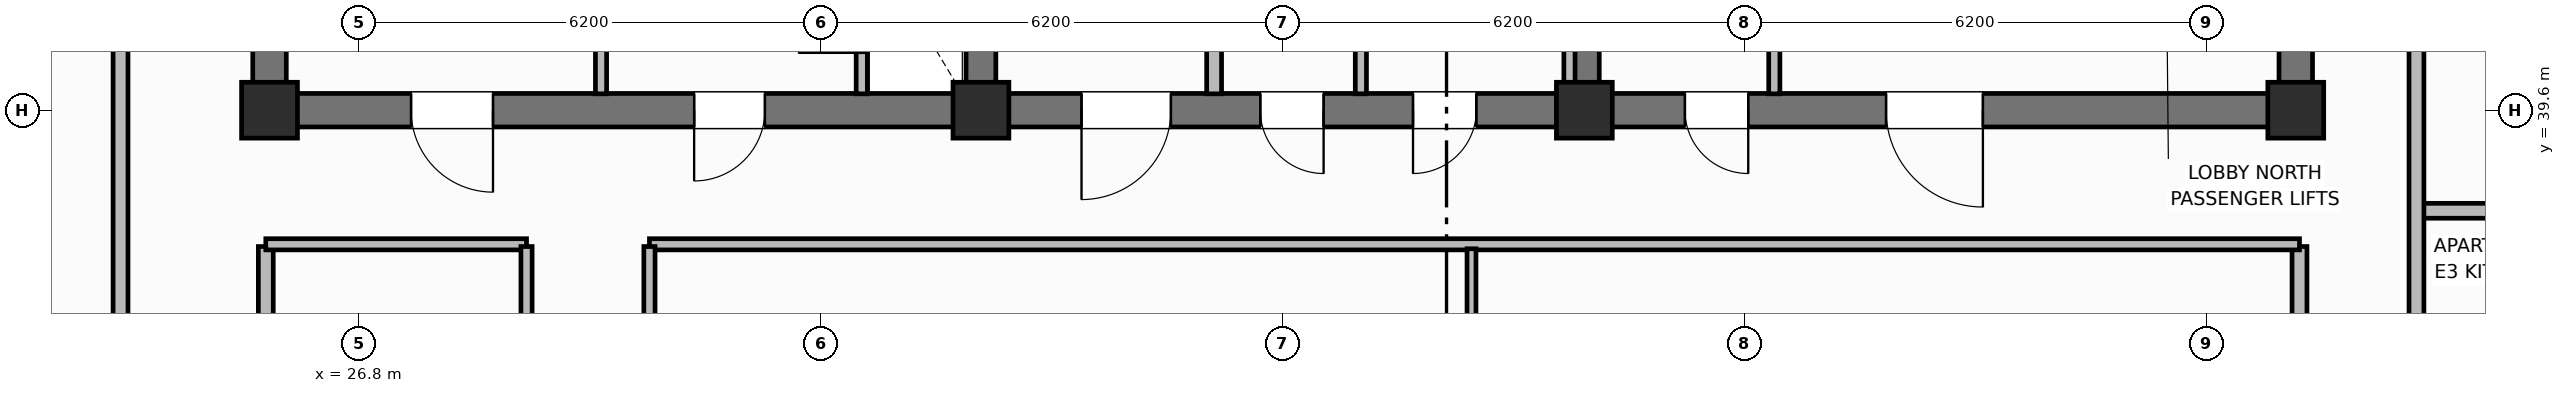
"""IFC4 building model, lengths in metres.
Left out: names, types, materials, properties, quantities, classifications, styles, units other than length and angle.
Written with IfcOpenShell. Run it as: python <this file> out.ifc"""

import sys

from ifc_helpers import new_model, si_unit, direction, frame, frame_2d, origin, origin_2d, place, context, subcontext, project, spatial, rectangle, extrude, element, fill, save


model = new_model("IFC4")
c1 = context("Model", 3, precision=1e-05, world=origin(), true_north=direction((0.0, 1.0)))
c2 = subcontext(c1, "Body", "Model", "MODEL_VIEW")
j1 = project(units=[si_unit("LENGTHUNIT", "METRE"), si_unit("PLANEANGLEUNIT", "RADIAN")], contexts=[c1])
p1 = place(None, origin())
s1 = spatial("IfcSite", under=j1, at=p1, CompositionType="ELEMENT")
p2 = place(p1, origin())
s2 = spatial("IfcBuilding", under=s1, at=p2, CompositionType="ELEMENT")
p3 = place(p2, frame((0.0, 0.0, 278.7)))
s3 = spatial("IfcBuildingStorey", under=s2, at=p3, CompositionType="ELEMENT", Elevation=278.7)
for number, where, z_axis, x_axis in (
    (1, (25.6, 39.825, 0.0), (0.0, 0.0, 1.0), (0.0, 1.0, 0.0)),
    (2, (52.8, 39.825, 0.0), (0.0, 0.0, 1.0), (0.0, 1.0, 0.0)),
):
    element("IfcWall", number, at=place(p3, frame(where, z_axis=z_axis, x_axis=x_axis)), inside=s3, PredefinedType="SHEAR", context=c2, shape_type="SweptSolid", body=[
        extrude(rectangle(XDim=5.75, YDim=0.45, at=frame_2d((2.875, 0.0))), origin(), (0.0, 0.0, 1.0), 3.7),
    ])
p4 = place(p3, frame((52.8, 39.6, 0.0), z_axis=(0.0, 0.0, 1.0), x_axis=(-1.0, 0.0, 0.0)))
e3 = element("IfcWall", 3, at=p4, inside=s3, PredefinedType="SHEAR", context=c2, shape_type="SweptSolid", body=[
    extrude(rectangle(XDim=27.2, YDim=0.45, at=frame_2d((13.6, 0.0))), origin(), (0.0, 0.0, 1.0), 3.7),
])
p5 = place(p4, frame((24.2, 0.0, 0.0)))
e4 = element("IfcOpeningElement", 4, at=p5, cuts=e3, PredefinedType="OPENING", context=c2, shape_type="SweptSolid", body=[
    extrude(rectangle(XDim=1.1, YDim=2.15, at=frame_2d((0.55, 1.075))), frame((0.0, 0.235, 0.0), z_axis=(0.0, -1.0, 0.0), x_axis=(1.0, 0.0, 0.0)), (0.0, 0.0, 1.0), 0.47),
])
p6 = place(p4, frame((20.55, 0.0, 0.0)))
e5 = element("IfcOpeningElement", 5, at=p6, cuts=e3, PredefinedType="OPENING", context=c2, shape_type="SweptSolid", body=[
    extrude(rectangle(XDim=0.95, YDim=2.1, at=frame_2d((0.475, 1.05))), frame((0.0, 0.235, 0.0), z_axis=(0.0, -1.0, 0.0), x_axis=(1.0, 0.0, 0.0)), (0.0, 0.0, 1.0), 0.47),
])
p7 = place(p4, frame((15.1, 0.0, 0.0)))
e6 = element("IfcOpeningElement", 6, at=p7, cuts=e3, PredefinedType="OPENING", context=c2, shape_type="SweptSolid", body=[
    extrude(rectangle(XDim=1.2, YDim=2.15, at=frame_2d((0.6, 1.075))), frame((0.0, 0.235, 0.0), z_axis=(0.0, -1.0, 0.0), x_axis=(1.0, 0.0, 0.0)), (0.0, 0.0, 1.0), 0.47),
])
p8 = place(p4, frame((13.05, 0.0, 0.0)))
e7 = element("IfcOpeningElement", 7, at=p8, cuts=e3, PredefinedType="OPENING", context=c2, shape_type="SweptSolid", body=[
    extrude(rectangle(XDim=0.85, YDim=2.1, at=frame_2d((0.425, 1.05))), frame((0.0, 0.235, 0.0), z_axis=(0.0, -1.0, 0.0), x_axis=(1.0, 0.0, 0.0)), (0.0, 0.0, 1.0), 0.47),
])
p9 = place(p4, frame((11.0, 0.0, 0.0)))
e8 = element("IfcOpeningElement", 8, at=p9, cuts=e3, PredefinedType="OPENING", context=c2, shape_type="SweptSolid", body=[
    extrude(rectangle(XDim=0.85, YDim=2.1, at=frame_2d((0.425, 1.05))), frame((0.0, 0.235, 0.0), z_axis=(0.0, -1.0, 0.0), x_axis=(1.0, 0.0, 0.0)), (0.0, 0.0, 1.0), 0.47),
])
p10 = place(p4, frame((7.35, 0.0, 0.0)))
e9 = element("IfcOpeningElement", 9, at=p10, cuts=e3, PredefinedType="OPENING", context=c2, shape_type="SweptSolid", body=[
    extrude(rectangle(XDim=0.85, YDim=2.1, at=frame_2d((0.425, 1.05))), frame((0.0, 0.235, 0.0), z_axis=(0.0, -1.0, 0.0), x_axis=(1.0, 0.0, 0.0)), (0.0, 0.0, 1.0), 0.47),
])
p11 = place(p4, frame((4.2, 0.0, 0.0)))
e10 = element("IfcOpeningElement", 10, at=p11, cuts=e3, PredefinedType="OPENING", context=c2, shape_type="SweptSolid", body=[
    extrude(rectangle(XDim=1.3, YDim=2.2, at=frame_2d((0.65, 1.1))), frame((0.0, 0.235, 0.0), z_axis=(0.0, -1.0, 0.0), x_axis=(1.0, 0.0, 0.0)), (0.0, 0.0, 1.0), 0.47),
])
for number, where, z_axis, x_axis in (
    (11, (35.15, 39.825, 0.0), (0.0, 0.0, 1.0), (0.0, 1.0, 0.0)),
    (12, (43.25, 39.825, 0.0), (0.0, 0.0, 1.0), (0.0, 1.0, 0.0)),
):
    element("IfcWall", number, at=place(p3, frame(where, z_axis=z_axis, x_axis=x_axis)), inside=s3, PredefinedType="SHEAR", context=c2, shape_type="SweptSolid", body=[
        extrude(rectangle(XDim=5.75, YDim=0.4, at=frame_2d((2.875, 0.0))), origin(), (0.0, 0.0, 1.0), 3.7),
    ])
for number, where, z_axis, x_axis in (
    (13, (25.6, 39.6, 0.0), (0.0, 0.0, 1.0), (1.0, 0.0, 0.0)),
    (14, (35.15, 39.6, 0.0), (0.0, 0.0, 1.0), (1.0, 0.0, 0.0)),
    (15, (43.25, 39.6, 0.0), (0.0, 0.0, 1.0), (1.0, 0.0, 0.0)),
    (16, (52.8, 39.6, 0.0), (0.0, 0.0, 1.0), (1.0, 0.0, 0.0)),
):
    element("IfcColumn", number, at=place(p3, frame(where, z_axis=z_axis, x_axis=x_axis)), inside=s3, PredefinedType="COLUMN", context=c2, shape_type="SweptSolid", body=[
        extrude(rectangle(XDim=0.75, YDim=0.75, at=origin_2d()), origin(), (0.0, 0.0, 1.0), 3.7),
    ])
p12 = place(p3, frame((33.55, 39.82, 0.0), z_axis=(0.0, 0.0, 1.0), x_axis=(0.0, 1.0, 0.0)))
e17 = element("IfcWall", 17, at=p12, inside=s3, PredefinedType="PARTITIONING", context=c2, shape_type="SweptSolid", body=[
    extrude(rectangle(XDim=2.13, YDim=0.15, at=frame_2d((1.065, 0.0))), origin(), (0.0, 0.0, 1.0), 2.56),
])
p13 = place(p12, frame((0.55, 0.0, 0.0)))
e18 = element("IfcOpeningElement", 18, at=p13, cuts=e17, PredefinedType="OPENING", context=c2, shape_type="SweptSolid", body=[
    extrude(rectangle(XDim=0.85, YDim=2.05, at=frame_2d((0.425, 1.025))), frame((0.0, 0.085, 0.0), z_axis=(0.0, -1.0, 0.0), x_axis=(1.0, 0.0, 0.0)), (0.0, 0.0, 1.0), 0.17),
])
p14 = place(p3, frame((30.05, 39.82, 0.0), z_axis=(0.0, 0.0, 1.0), x_axis=(0.0, 1.0, 0.0)))
e19 = element("IfcWall", 19, at=p14, inside=s3, PredefinedType="PARTITIONING", context=c2, shape_type="SweptSolid", body=[
    extrude(rectangle(XDim=2.13, YDim=0.15, at=frame_2d((1.065, 0.0))), origin(), (0.0, 0.0, 1.0), 2.56),
])
p15 = place(p3, frame((38.28, 39.82, 0.0), z_axis=(0.0, 0.0, 1.0), x_axis=(0.0, 1.0, 0.0)))
e20 = element("IfcWall", 20, at=p15, inside=s3, PredefinedType="PARTITIONING", context=c2, shape_type="SweptSolid", body=[
    extrude(rectangle(XDim=5.63, YDim=0.2, at=frame_2d((2.815, 0.0))), origin(), (0.0, 0.0, 1.0), 2.56),
])
for number, where, z_axis, x_axis in (
    (21, (43.05, 39.82, 0.0), (0.0, 0.0, 1.0), (0.0, 1.0, 0.0)),
    (22, (40.25, 39.82, 0.0), (0.0, 0.0, 1.0), (0.0, 1.0, 0.0)),
    (23, (45.8, 39.82, 0.0), (0.0, 0.0, 1.0), (0.0, 1.0, 0.0)),
):
    element("IfcWall", number, at=place(p3, frame(where, z_axis=z_axis, x_axis=x_axis)), inside=s3, PredefinedType="PARTITIONING", context=c2, shape_type="SweptSolid", body=[
        extrude(rectangle(XDim=5.63, YDim=0.15, at=frame_2d((2.815, 0.0))), origin(), (0.0, 0.0, 1.0), 2.56),
    ])
for number, where, z_axis, x_axis in (
    (24, (25.55, 18.63, 0.0), (0.0, 0.0, 1.0), (0.0, 1.0, 0.0)),
    (25, (52.85, 18.63, 0.0), (0.0, 0.0, 1.0), (0.0, 1.0, 0.0)),
):
    element("IfcWall", number, at=place(p3, frame(where, z_axis=z_axis, x_axis=x_axis)), inside=s3, PredefinedType="PARTITIONING", context=c2, shape_type="SweptSolid", body=[
        extrude(rectangle(XDim=19.14, YDim=0.2, at=frame_2d((9.57, 0.0))), origin(), (0.0, 0.0, 1.0), 2.56),
    ])
p16 = place(p3, frame((25.55, 37.8, 0.0), z_axis=(0.0, 0.0, 1.0), x_axis=(1.0, 0.0, 0.0)))
e26 = element("IfcWall", 26, at=p16, inside=s3, PredefinedType="PARTITIONING", context=c2, shape_type="SweptSolid", body=[
    extrude(rectangle(XDim=3.5, YDim=0.15, at=frame_2d((1.75, 0.0))), origin(), (0.0, 0.0, 1.0), 2.56),
])
p17 = place(p3, frame((30.7, 37.8, 0.0), z_axis=(0.0, 0.0, 1.0), x_axis=(1.0, 0.0, 0.0)))
e27 = element("IfcWall", 27, at=p17, inside=s3, PredefinedType="PARTITIONING", context=c2, shape_type="SweptSolid", body=[
    extrude(rectangle(XDim=22.15, YDim=0.15, at=frame_2d((11.075, 0.0))), origin(), (0.0, 0.0, 1.0), 2.56),
])
p18 = place(p3, frame((41.735, 29.388, 0.0), z_axis=(0.0, 0.0, 1.0), x_axis=(0.0, 1.0, 0.0)))
e28 = element("IfcWall", 28, at=p18, inside=s3, PredefinedType="PARTITIONING", context=c2, shape_type="SweptSolid", body=[
    extrude(rectangle(XDim=8.352, YDim=0.12, at=frame_2d((4.176, 0.0))), origin(), (0.0, 0.0, 1.0), 2.56),
])
p19 = place(p18, frame((2.0, 0.0, 0.0)))
e29 = element("IfcOpeningElement", 29, at=p19, cuts=e28, PredefinedType="OPENING", context=c2, shape_type="SweptSolid", body=[
    extrude(rectangle(XDim=0.9, YDim=2.1, at=frame_2d((0.45, 1.05))), frame((0.0, 0.07, 0.0), z_axis=(0.0, -1.0, 0.0), x_axis=(1.0, 0.0, 0.0)), (0.0, 0.0, 1.0), 0.14),
])
p20 = place(p3, frame((29.05, 18.63, 0.0), z_axis=(0.0, 0.0, 1.0), x_axis=(0.0, 1.0, 0.0)))
e30 = element("IfcWall", 30, at=p20, inside=s3, PredefinedType="PARTITIONING", context=c2, shape_type="SweptSolid", body=[
    extrude(rectangle(XDim=19.14, YDim=0.15, at=frame_2d((9.57, 0.0))), origin(), (0.0, 0.0, 1.0), 2.56),
])
p21 = place(p20, frame((5.5, 0.0, 0.0)))
e31 = element("IfcOpeningElement", 31, at=p21, cuts=e30, PredefinedType="OPENING", context=c2, shape_type="SweptSolid", body=[
    extrude(rectangle(XDim=1.0, YDim=2.15, at=frame_2d((0.5, 1.075))), frame((0.0, 0.085, 0.0), z_axis=(0.0, -1.0, 0.0), x_axis=(1.0, 0.0, 0.0)), (0.0, 0.0, 1.0), 0.17),
])
p22 = place(p3, frame((30.7, 18.63, 0.0), z_axis=(0.0, 0.0, 1.0), x_axis=(0.0, 1.0, 0.0)))
e32 = element("IfcWall", 32, at=p22, inside=s3, PredefinedType="PARTITIONING", context=c2, shape_type="SweptSolid", body=[
    extrude(rectangle(XDim=19.14, YDim=0.15, at=frame_2d((9.57, 0.0))), origin(), (0.0, 0.0, 1.0), 2.56),
])
p23 = place(p22, frame((2.2, 0.0, 0.0)))
e33 = element("IfcOpeningElement", 33, at=p23, cuts=e32, PredefinedType="OPENING", context=c2, shape_type="SweptSolid", body=[
    extrude(rectangle(XDim=1.0, YDim=2.15, at=frame_2d((0.5, 1.075))), frame((0.0, 0.085, 0.0), z_axis=(0.0, -1.0, 0.0), x_axis=(1.0, 0.0, 0.0)), (0.0, 0.0, 1.0), 0.17),
])
p24 = place(p22, frame((12.719, 0.0, 0.0)))
e34 = element("IfcOpeningElement", 34, at=p24, cuts=e32, PredefinedType="OPENING", context=c2, shape_type="SweptSolid", body=[
    extrude(rectangle(XDim=1.0, YDim=2.15, at=frame_2d((0.5, 1.075))), frame((0.0, 0.085, 0.0), z_axis=(0.0, -1.0, 0.0), x_axis=(1.0, 0.0, 0.0)), (0.0, 0.0, 1.0), 0.17),
])
p25 = place(p3, frame((23.6, 9.95, 0.0), z_axis=(0.0, 0.0, 1.0), x_axis=(0.0, 1.0, 0.0)))
e35 = element("IfcWall", 35, at=p25, inside=s3, PredefinedType="PARTITIONING", context=c2, shape_type="SweptSolid", body=[
    extrude(rectangle(XDim=36.5, YDim=0.2, at=frame_2d((18.25, 0.0))), origin(), (0.0, 0.0, 1.0), 2.56),
])
p26 = place(p25, frame((3.25, 0.0, 0.0)))
e36 = element("IfcOpeningElement", 36, at=p26, cuts=e35, PredefinedType="OPENING", context=c2, shape_type="SweptSolid", body=[
    extrude(rectangle(XDim=1.0, YDim=2.15, at=frame_2d((0.5, 1.075))), frame((0.0, 0.11, 0.0), z_axis=(0.0, -1.0, 0.0), x_axis=(1.0, 0.0, 0.0)), (0.0, 0.0, 1.0), 0.22),
])
p27 = place(p3, frame((54.42, 38.25, 0.0), z_axis=(0.0, 0.0, 1.0), x_axis=(1.0, 0.0, 0.0)))
e37 = element("IfcWall", 37, at=p27, inside=s3, PredefinedType="PARTITIONING", context=c2, shape_type="SweptSolid", body=[
    extrude(rectangle(XDim=4.45, YDim=0.2, at=frame_2d((2.225, 0.0))), origin(), (0.0, 0.0, 1.0), 2.56),
])
p28 = place(p3, frame((54.42, 9.95, 0.0), z_axis=(0.0, 0.0, 1.0), x_axis=(0.0, 1.0, 0.0)))
e38 = element("IfcWall", 38, at=p28, inside=s3, PredefinedType="PARTITIONING", context=c2, shape_type="SweptSolid", body=[
    extrude(rectangle(XDim=36.5, YDim=0.2, at=frame_2d((18.25, 0.0))), origin(), (0.0, 0.0, 1.0), 2.56),
])
p29 = place(p28, frame((3.11, 0.0, 0.0)))
e39 = element("IfcOpeningElement", 39, at=p29, cuts=e38, PredefinedType="OPENING", context=c2, shape_type="SweptSolid", body=[
    extrude(rectangle(XDim=1.0, YDim=2.15, at=frame_2d((0.5, 1.075))), frame((0.0, 0.11, 0.0), z_axis=(0.0, -1.0, 0.0), x_axis=(1.0, 0.0, 0.0)), (0.0, 0.0, 1.0), 0.22),
])
p30 = place(p28, frame((11.99, 0.0, 0.0)))
e40 = element("IfcOpeningElement", 40, at=p30, cuts=e38, PredefinedType="OPENING", context=c2, shape_type="SweptSolid", body=[
    extrude(rectangle(XDim=1.0, YDim=2.15, at=frame_2d((0.5, 1.075))), frame((0.0, 0.11, 0.0), z_axis=(0.0, -1.0, 0.0), x_axis=(1.0, 0.0, 0.0)), (0.0, 0.0, 1.0), 0.22),
])
p31 = place(p28, frame((23.5, 0.0, 0.0)))
e41 = element("IfcOpeningElement", 41, at=p31, cuts=e38, PredefinedType="OPENING", context=c2, shape_type="SweptSolid", body=[
    extrude(rectangle(XDim=1.0, YDim=2.15, at=frame_2d((0.5, 1.075))), frame((0.0, 0.11, 0.0), z_axis=(0.0, -1.0, 0.0), x_axis=(1.0, 0.0, 0.0)), (0.0, 0.0, 1.0), 0.22),
])
p32 = place(p28, frame((31.2, 0.0, 0.0)))
e42 = element("IfcOpeningElement", 42, at=p32, cuts=e38, PredefinedType="OPENING", context=c2, shape_type="SweptSolid", body=[
    extrude(rectangle(XDim=1.0, YDim=2.15, at=frame_2d((0.5, 1.075))), frame((0.0, 0.11, 0.0), z_axis=(0.0, -1.0, 0.0), x_axis=(1.0, 0.0, 0.0)), (0.0, 0.0, 1.0), 0.22),
])
p33 = place(p13, origin())
e43 = element("IfcDoor", 43, at=p33, inside=s3, OperationType="SINGLE_SWING_LEFT", PredefinedType="TRAPDOOR", context=c2, shape_type="SweptSolid", body=[
    extrude(rectangle(XDim=0.85, YDim=2.05, at=frame_2d((0.425, 1.025))), frame((0.0, 0.025, 0.0), z_axis=(0.0, -1.0, 0.0), x_axis=(1.0, 0.0, 0.0)), (0.0, 0.0, 1.0), 0.05),
])
fill(e18, e43)
p34 = place(p5, origin())
e44 = element("IfcDoor", 44, at=p34, inside=s3, OperationType="SINGLE_SWING_LEFT", PredefinedType="DOOR", context=c2, shape_type="SweptSolid", body=[
    extrude(rectangle(XDim=1.1, YDim=2.15, at=frame_2d((0.55, 1.075))), frame((0.0, 0.025, 0.0), z_axis=(0.0, -1.0, 0.0), x_axis=(1.0, 0.0, 0.0)), (0.0, 0.0, 1.0), 0.05),
])
fill(e4, e44)
p35 = place(p6, origin())
e45 = element("IfcDoor", 45, at=p35, inside=s3, OperationType="SINGLE_SWING_RIGHT", PredefinedType="DOOR", context=c2, shape_type="SweptSolid", body=[
    extrude(rectangle(XDim=0.95, YDim=2.1, at=frame_2d((0.475, 1.05))), frame((0.0, 0.025, 0.0), z_axis=(0.0, -1.0, 0.0), x_axis=(1.0, 0.0, 0.0)), (0.0, 0.0, 1.0), 0.05),
])
fill(e5, e45)
p36 = place(p7, origin())
e46 = element("IfcDoor", 46, at=p36, inside=s3, OperationType="SINGLE_SWING_RIGHT", PredefinedType="DOOR", context=c2, shape_type="SweptSolid", body=[
    extrude(rectangle(XDim=1.2, YDim=2.15, at=frame_2d((0.6, 1.075))), frame((0.0, 0.025, 0.0), z_axis=(0.0, -1.0, 0.0), x_axis=(1.0, 0.0, 0.0)), (0.0, 0.0, 1.0), 0.05),
])
fill(e6, e46)
p37 = place(p8, origin())
e47 = element("IfcDoor", 47, at=p37, inside=s3, OperationType="SINGLE_SWING_LEFT", PredefinedType="DOOR", context=c2, shape_type="SweptSolid", body=[
    extrude(rectangle(XDim=0.85, YDim=2.1, at=frame_2d((0.425, 1.05))), frame((0.0, 0.025, 0.0), z_axis=(0.0, -1.0, 0.0), x_axis=(1.0, 0.0, 0.0)), (0.0, 0.0, 1.0), 0.05),
])
fill(e7, e47)
p38 = place(p9, origin())
e48 = element("IfcDoor", 48, at=p38, inside=s3, OperationType="SINGLE_SWING_RIGHT", PredefinedType="DOOR", context=c2, shape_type="SweptSolid", body=[
    extrude(rectangle(XDim=0.85, YDim=2.1, at=frame_2d((0.425, 1.05))), frame((0.0, 0.025, 0.0), z_axis=(0.0, -1.0, 0.0), x_axis=(1.0, 0.0, 0.0)), (0.0, 0.0, 1.0), 0.05),
])
fill(e8, e48)
p39 = place(p10, origin())
e49 = element("IfcDoor", 49, at=p39, inside=s3, OperationType="SINGLE_SWING_LEFT", PredefinedType="DOOR", context=c2, shape_type="SweptSolid", body=[
    extrude(rectangle(XDim=0.85, YDim=2.1, at=frame_2d((0.425, 1.05))), frame((0.0, 0.025, 0.0), z_axis=(0.0, -1.0, 0.0), x_axis=(1.0, 0.0, 0.0)), (0.0, 0.0, 1.0), 0.05),
])
fill(e9, e49)
p40 = place(p11, origin())
e50 = element("IfcDoor", 50, at=p40, inside=s3, OperationType="SINGLE_SWING_LEFT", PredefinedType="DOOR", context=c2, shape_type="SweptSolid", body=[
    extrude(rectangle(XDim=1.3, YDim=2.2, at=frame_2d((0.65, 1.1))), frame((0.0, 0.025, 0.0), z_axis=(0.0, -1.0, 0.0), x_axis=(1.0, 0.0, 0.0)), (0.0, 0.0, 1.0), 0.05),
])
fill(e10, e50)
save(model, sys.argv[1])
